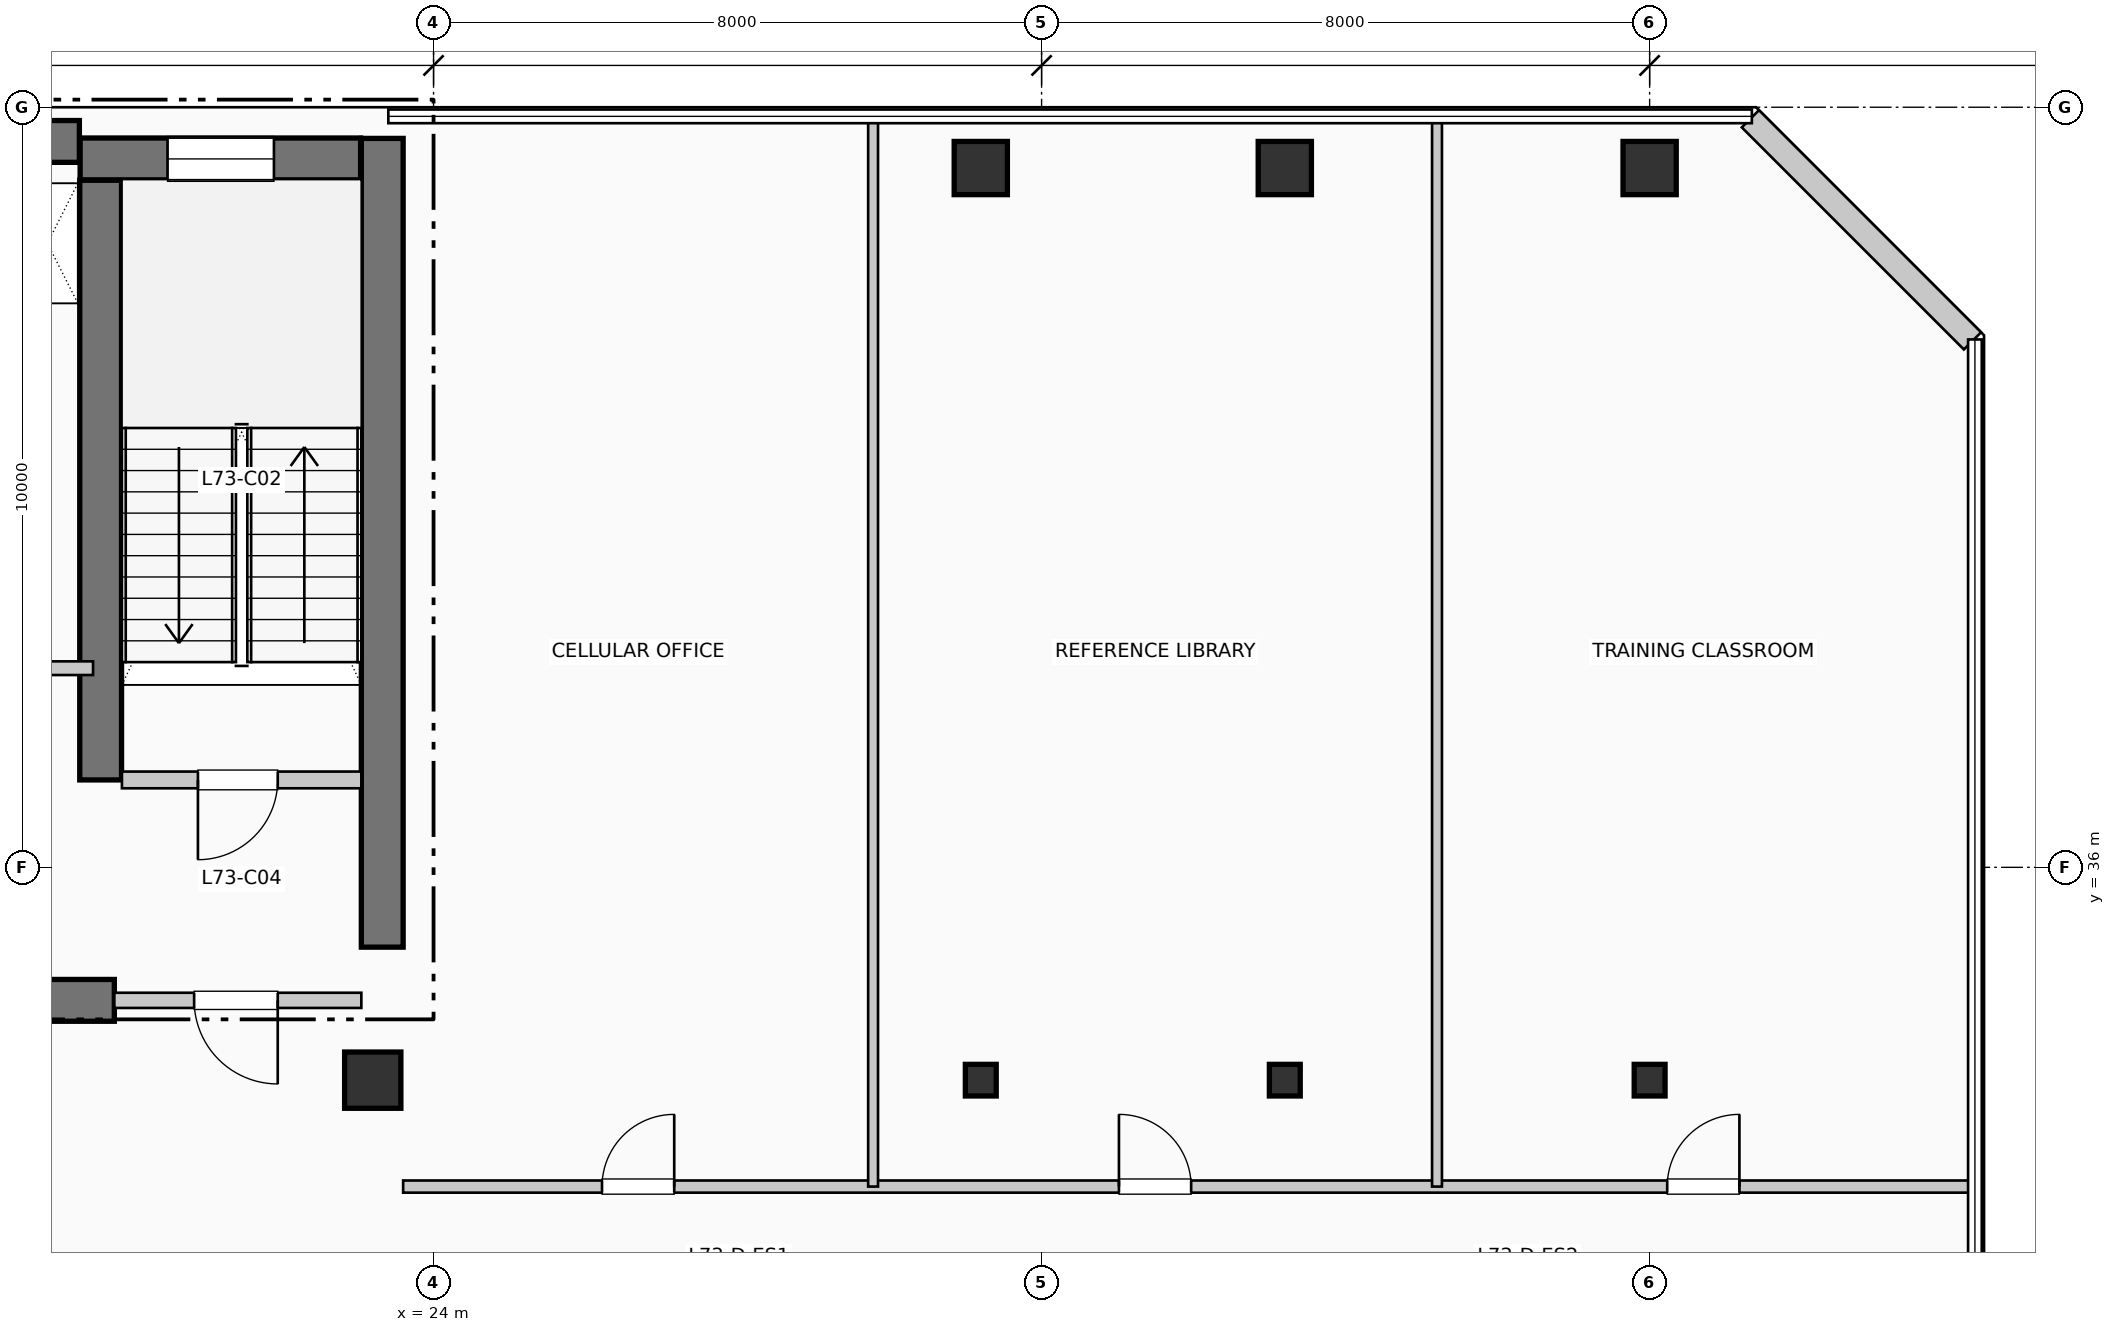
"""IFC4 building model, lengths in metres.
Left out: names, types, materials, properties, quantities, classifications, styles, units other than length and angle.
Written with IfcOpenShell. Run it as: python <this file> out.ifc"""

import sys

from ifc_helpers import new_model, si_unit, direction, frame, frame_2d, origin, origin_2d, place, context, subcontext, project, spatial, rectangle, i_section, extrude, element, fill, save


model = new_model("IFC4")
c1 = context("Model", 3, precision=1e-05, world=origin(), true_north=direction((0.0, 1.0)))
c2 = subcontext(c1, "Body", "Model", "MODEL_VIEW")
j1 = project(units=[si_unit("LENGTHUNIT", "METRE"), si_unit("PLANEANGLEUNIT", "RADIAN")], contexts=[c1])
p1 = place(None, origin())
s1 = spatial("IfcSite", under=j1, at=p1, CompositionType="ELEMENT")
p2 = place(p1, origin())
s2 = spatial("IfcBuilding", under=s1, at=p2, CompositionType="ELEMENT")
p3 = place(p2, frame((0.0, 0.0, 299.97)))
s3 = spatial("IfcBuildingStorey", under=s2, at=p3, CompositionType="ELEMENT", Elevation=299.97)
p4 = place(p3, frame((5.36, 45.55, 0.0), z_axis=(0.0, 0.0, 1.0), x_axis=(1.0, 0.0, 0.0)))
e1 = element("IfcWall", 1, at=p4, inside=s3, PredefinedType="SHEAR", context=c2, shape_type="SweptSolid", body=[
    extrude(rectangle(XDim=13.98, YDim=0.55, at=frame_2d((6.99, 0.0))), origin(), (0.0, 0.0, 1.0), 3.96),
])
p5 = place(p3, frame((23.325, 34.95, 0.0), z_axis=(0.0, 0.0, 1.0), x_axis=(0.0, 1.0, 0.0)))
e2 = element("IfcWall", 2, at=p5, inside=s3, PredefinedType="SHEAR", context=c2, shape_type="SweptSolid", body=[
    extrude(rectangle(XDim=10.64, YDim=0.55, at=frame_2d((5.32, 0.0))), origin(), (0.0, 0.0, 1.0), 3.96),
])
p6 = place(p3, frame((13.68, 34.25, 0.0), z_axis=(0.0, 0.0, 1.0), x_axis=(1.0, 0.0, 0.0)))
e3 = element("IfcWall", 3, at=p6, inside=s3, PredefinedType="SHEAR", context=c2, shape_type="SweptSolid", body=[
    extrude(rectangle(XDim=6.12, YDim=0.55, at=frame_2d((3.06, 0.0))), origin(), (0.0, 0.0, 1.0), 3.96),
])
p7 = place(p3, frame((19.62, 37.15, 0.0), z_axis=(0.0, 0.0, 1.0), x_axis=(0.0, 1.0, 0.0)))
e4 = element("IfcWall", 4, at=p7, inside=s3, PredefinedType="SHEAR", context=c2, shape_type="SweptSolid", body=[
    extrude(rectangle(XDim=7.89, YDim=0.55, at=frame_2d((3.945, 0.0))), origin(), (0.0, 0.0, 1.0), 3.96),
])
p8 = place(p3, frame((19.35, 45.32, 0.0), z_axis=(0.0, 0.0, 1.0), x_axis=(1.0, 0.0, 0.0)))
e5 = element("IfcWall", 5, at=p8, inside=s3, PredefinedType="SHEAR", context=c2, shape_type="SweptSolid", body=[
    extrude(rectangle(XDim=3.69, YDim=0.55, at=frame_2d((1.845, 0.0))), origin(), (0.0, 0.0, 1.0), 3.96),
])
p9 = place(p8, frame((1.15, 0.0, 1.05)))
e6 = element("IfcOpeningElement", 6, at=p9, cuts=e5, PredefinedType="OPENING", context=c2, shape_type="SweptSolid", body=[
    extrude(rectangle(XDim=1.4, YDim=1.8, at=frame_2d((0.7, 0.9))), frame((0.0, 0.285, 0.0), z_axis=(0.0, -1.0, 0.0), x_axis=(1.0, 0.0, 0.0)), (0.0, 0.0, 1.0), 0.57),
])
p10 = place(p3, frame((23.2, 33.2, 0.0), z_axis=(0.0, 0.0, 1.0), x_axis=(1.0, 0.0, 0.0)))
e7 = element("IfcColumn", 7, at=p10, inside=s3, PredefinedType="COLUMN", context=c2, shape_type="SweptSolid", body=[
    extrude(rectangle(XDim=0.74, YDim=0.74, at=origin_2d()), origin(), (0.0, 0.0, 1.0), 3.96),
])
p11 = place(p3, frame((31.2, 33.2, 0.0), z_axis=(0.0, 0.0, 1.0), x_axis=(1.0, 0.0, 0.0)))
e8 = element("IfcColumn", 8, at=p11, inside=s3, PredefinedType="COLUMN", context=c2, shape_type="SweptSolid", body=[
    extrude(i_section(OverallWidth=0.406, OverallDepth=0.416, WebThickness=0.022, FlangeThickness=0.036, at=origin_2d()), origin(), (0.0, 0.0, 1.0), 3.96),
])
p12 = place(p3, frame((31.2, 45.2, 0.0), z_axis=(0.0, 0.0, 1.0), x_axis=(1.0, 0.0, 0.0)))
e9 = element("IfcColumn", 9, at=p12, inside=s3, PredefinedType="COLUMN", context=c2, shape_type="SweptSolid", body=[
    extrude(rectangle(XDim=0.7, YDim=0.7, at=origin_2d()), origin(), (0.0, 0.0, 1.0), 3.96),
])
p13 = place(p3, frame((35.2, 33.2, 0.0), z_axis=(0.0, 0.0, 1.0), x_axis=(1.0, 0.0, 0.0)))
e10 = element("IfcColumn", 10, at=p13, inside=s3, PredefinedType="COLUMN", context=c2, shape_type="SweptSolid", body=[
    extrude(i_section(OverallWidth=0.406, OverallDepth=0.416, WebThickness=0.022, FlangeThickness=0.036, at=origin_2d()), origin(), (0.0, 0.0, 1.0), 3.96),
])
p14 = place(p3, frame((35.2, 45.2, 0.0), z_axis=(0.0, 0.0, 1.0), x_axis=(1.0, 0.0, 0.0)))
e11 = element("IfcColumn", 11, at=p14, inside=s3, PredefinedType="COLUMN", context=c2, shape_type="SweptSolid", body=[
    extrude(rectangle(XDim=0.7, YDim=0.7, at=origin_2d()), origin(), (0.0, 0.0, 1.0), 3.96),
])
p15 = place(p3, frame((40.0, 33.2, 0.0), z_axis=(0.0, 0.0, 1.0), x_axis=(1.0, 0.0, 0.0)))
e12 = element("IfcColumn", 12, at=p15, inside=s3, PredefinedType="COLUMN", context=c2, shape_type="SweptSolid", body=[
    extrude(i_section(OverallWidth=0.406, OverallDepth=0.416, WebThickness=0.022, FlangeThickness=0.036, at=origin_2d()), origin(), (0.0, 0.0, 1.0), 3.96),
])
p16 = place(p3, frame((40.0, 45.2, 0.0), z_axis=(0.0, 0.0, 1.0), x_axis=(1.0, 0.0, 0.0)))
e13 = element("IfcColumn", 13, at=p16, inside=s3, PredefinedType="COLUMN", context=c2, shape_type="SweptSolid", body=[
    extrude(rectangle(XDim=0.7, YDim=0.7, at=origin_2d()), origin(), (0.0, 0.0, 1.0), 3.96),
])
p17 = place(p3, frame((44.248, 42.926, 0.0), z_axis=(0.0, 0.0, 1.0), x_axis=(-0.707136318428, 0.707077242712, 0.0)))
e14 = element("IfcWall", 14, at=p17, inside=s3, PredefinedType="SOLIDWALL", context=c2, shape_type="SweptSolid", body=[
    extrude(rectangle(XDim=4.133, YDim=0.32, at=frame_2d((2.066, 0.0))), origin(), (0.0, 0.0, 1.0), 3.74),
])
p18 = place(p3, frame((19.9, 37.15, 0.0), z_axis=(0.0, 0.0, 1.0), x_axis=(1.0, 0.0, 0.0)))
e15 = element("IfcWall", 15, at=p18, inside=s3, PredefinedType="PARTITIONING", context=c2, shape_type="SweptSolid", body=[
    extrude(rectangle(XDim=3.15, YDim=0.22, at=frame_2d((1.575, 0.0))), origin(), (0.0, 0.0, 1.0), 3.74),
])
p19 = place(p18, frame((2.05, 0.0, 0.0), z_axis=(0.0, 0.0, 1.0), x_axis=(-1.0, 0.0, 0.0)))
e16 = element("IfcOpeningElement", 16, at=p19, cuts=e15, PredefinedType="OPENING", context=c2, shape_type="SweptSolid", body=[
    extrude(rectangle(XDim=1.05, YDim=2.15, at=frame_2d((0.525, 1.075))), frame((0.0, 0.12, 0.0), z_axis=(0.0, -1.0, 0.0), x_axis=(1.0, 0.0, 0.0)), (0.0, 0.0, 1.0), 0.24),
])
p20 = place(p3, frame((19.8, 34.25, 0.0), z_axis=(0.0, 0.0, 1.0), x_axis=(1.0, 0.0, 0.0)))
e17 = element("IfcWall", 17, at=p20, inside=s3, PredefinedType="PARTITIONING", context=c2, shape_type="SweptSolid", body=[
    extrude(rectangle(XDim=3.25, YDim=0.2, at=frame_2d((1.625, 0.0))), origin(), (0.0, 0.0, 1.0), 3.74),
])
p21 = place(p20, frame((2.15, 0.0, 0.0), z_axis=(0.0, 0.0, 1.0), x_axis=(-1.0, 0.0, 0.0)))
e18 = element("IfcOpeningElement", 18, at=p21, cuts=e17, PredefinedType="OPENING", context=c2, shape_type="SweptSolid", body=[
    extrude(rectangle(XDim=1.1, YDim=2.15, at=frame_2d((0.55, 1.075))), frame((0.0, 0.11, 0.0), z_axis=(0.0, -1.0, 0.0), x_axis=(1.0, 0.0, 0.0)), (0.0, 0.0, 1.0), 0.22),
])
p22 = place(p3, frame((17.68, 38.62, 0.0), z_axis=(0.0, 0.0, 1.0), x_axis=(1.0, 0.0, 0.0)))
e19 = element("IfcWall", 19, at=p22, inside=s3, PredefinedType="PARTITIONING", context=c2, shape_type="SweptSolid", body=[
    extrude(rectangle(XDim=1.84, YDim=0.18, at=frame_2d((0.92, 0.0))), origin(), (0.0, 0.0, 1.0), 3.74),
])
p23 = place(p22, frame((0.24, 0.0, 0.0)))
e20 = element("IfcOpeningElement", 20, at=p23, cuts=e19, PredefinedType="OPENING", context=c2, shape_type="SweptSolid", body=[
    extrude(rectangle(XDim=0.92, YDim=2.1, at=frame_2d((0.46, 1.05))), frame((0.0, 0.1, 0.0), z_axis=(0.0, -1.0, 0.0), x_axis=(1.0, 0.0, 0.0)), (0.0, 0.0, 1.0), 0.2),
])
p24 = place(p3, frame((23.6, 31.8, 0.0), z_axis=(0.0, 0.0, 1.0), x_axis=(1.0, 0.0, 0.0)))
e21 = element("IfcWall", 21, at=p24, inside=s3, PredefinedType="PARTITIONING", context=c2, shape_type="SweptSolid", body=[
    extrude(rectangle(XDim=20.61, YDim=0.16, at=frame_2d((10.305, 0.0))), origin(), (0.0, 0.0, 1.0), 3.74),
])
p25 = place(p24, frame((2.616, 0.0, 0.0)))
e22 = element("IfcOpeningElement", 22, at=p25, cuts=e21, PredefinedType="OPENING", context=c2, shape_type="SweptSolid", body=[
    extrude(rectangle(XDim=0.95, YDim=2.15, at=frame_2d((0.475, 1.075))), frame((0.0, 0.09, 0.0), z_axis=(0.0, -1.0, 0.0), x_axis=(1.0, 0.0, 0.0)), (0.0, 0.0, 1.0), 0.18),
])
p26 = place(p24, frame((9.418, 0.0, 0.0)))
e23 = element("IfcOpeningElement", 23, at=p26, cuts=e21, PredefinedType="OPENING", context=c2, shape_type="SweptSolid", body=[
    extrude(rectangle(XDim=0.95, YDim=2.15, at=frame_2d((0.475, 1.075))), frame((0.0, 0.09, 0.0), z_axis=(0.0, -1.0, 0.0), x_axis=(1.0, 0.0, 0.0)), (0.0, 0.0, 1.0), 0.18),
])
p27 = place(p24, frame((16.631, 0.0, 0.0)))
e24 = element("IfcOpeningElement", 24, at=p27, cuts=e21, PredefinedType="OPENING", context=c2, shape_type="SweptSolid", body=[
    extrude(rectangle(XDim=0.95, YDim=2.15, at=frame_2d((0.475, 1.075))), frame((0.0, 0.09, 0.0), z_axis=(0.0, -1.0, 0.0), x_axis=(1.0, 0.0, 0.0)), (0.0, 0.0, 1.0), 0.18),
])
for number, where, z_axis, x_axis in (
    (25, (29.783, 31.8, 0.0), (0.0, 0.0, 1.0), (0.0, 1.0, 0.0)),
    (26, (37.203, 31.8, 0.0), (0.0, 0.0, 1.0), (0.0, 1.0, 0.0)),
):
    element("IfcWall", number, at=place(p3, frame(where, z_axis=z_axis, x_axis=x_axis)), inside=s3, PredefinedType="PARTITIONING", context=c2, shape_type="SweptSolid", body=[
        extrude(rectangle(XDim=14.01, YDim=0.13, at=frame_2d((7.005, 0.0))), origin(), (0.0, 0.0, 1.0), 3.74),
    ])
p28 = place(p9, origin())
e27 = element("IfcWindow", 27, at=p28, inside=s3, PartitioningType="SINGLE_PANEL", PredefinedType="WINDOW", context=c2, shape_type="SweptSolid", body=[
    extrude(rectangle(XDim=1.4, YDim=1.8, at=frame_2d((0.7, 0.9))), frame((0.0, 0.03, 0.0), z_axis=(0.0, -1.0, 0.0), x_axis=(1.0, 0.0, 0.0)), (0.0, 0.0, 1.0), 0.06),
])
fill(e6, e27)
p29 = place(p19, origin())
e28 = element("IfcDoor", 28, at=p29, inside=s3, OperationType="SINGLE_SWING_LEFT", PredefinedType="DOOR", context=c2, shape_type="SweptSolid", body=[
    extrude(rectangle(XDim=1.05, YDim=2.15, at=frame_2d((0.525, 1.075))), frame((0.0, 0.025, 0.0), z_axis=(0.0, -1.0, 0.0), x_axis=(1.0, 0.0, 0.0)), (0.0, 0.0, 1.0), 0.05),
])
fill(e16, e28)
p30 = place(p21, origin())
e29 = element("IfcDoor", 29, at=p30, inside=s3, OperationType="SINGLE_SWING_RIGHT", PredefinedType="DOOR", context=c2, shape_type="SweptSolid", body=[
    extrude(rectangle(XDim=1.1, YDim=2.15, at=frame_2d((0.55, 1.075))), frame((0.0, 0.025, 0.0), z_axis=(0.0, -1.0, 0.0), x_axis=(1.0, 0.0, 0.0)), (0.0, 0.0, 1.0), 0.05),
])
fill(e18, e29)
p31 = place(p25, origin())
e30 = element("IfcDoor", 30, at=p31, inside=s3, OperationType="SINGLE_SWING_RIGHT", PredefinedType="DOOR", context=c2, shape_type="SweptSolid", body=[
    extrude(rectangle(XDim=0.95, YDim=2.15, at=frame_2d((0.475, 1.075))), frame((0.0, 0.025, 0.0), z_axis=(0.0, -1.0, 0.0), x_axis=(1.0, 0.0, 0.0)), (0.0, 0.0, 1.0), 0.05),
])
fill(e22, e30)
p32 = place(p26, origin())
e31 = element("IfcDoor", 31, at=p32, inside=s3, OperationType="SINGLE_SWING_LEFT", PredefinedType="DOOR", context=c2, shape_type="SweptSolid", body=[
    extrude(rectangle(XDim=0.95, YDim=2.15, at=frame_2d((0.475, 1.075))), frame((0.0, 0.025, 0.0), z_axis=(0.0, -1.0, 0.0), x_axis=(1.0, 0.0, 0.0)), (0.0, 0.0, 1.0), 0.05),
])
fill(e23, e31)
p33 = place(p27, origin())
e32 = element("IfcDoor", 32, at=p33, inside=s3, OperationType="SINGLE_SWING_RIGHT", PredefinedType="DOOR", context=c2, shape_type="SweptSolid", body=[
    extrude(rectangle(XDim=0.95, YDim=2.15, at=frame_2d((0.475, 1.075))), frame((0.0, 0.025, 0.0), z_axis=(0.0, -1.0, 0.0), x_axis=(1.0, 0.0, 0.0)), (0.0, 0.0, 1.0), 0.05),
])
fill(e24, e32)
save(model, sys.argv[1])
